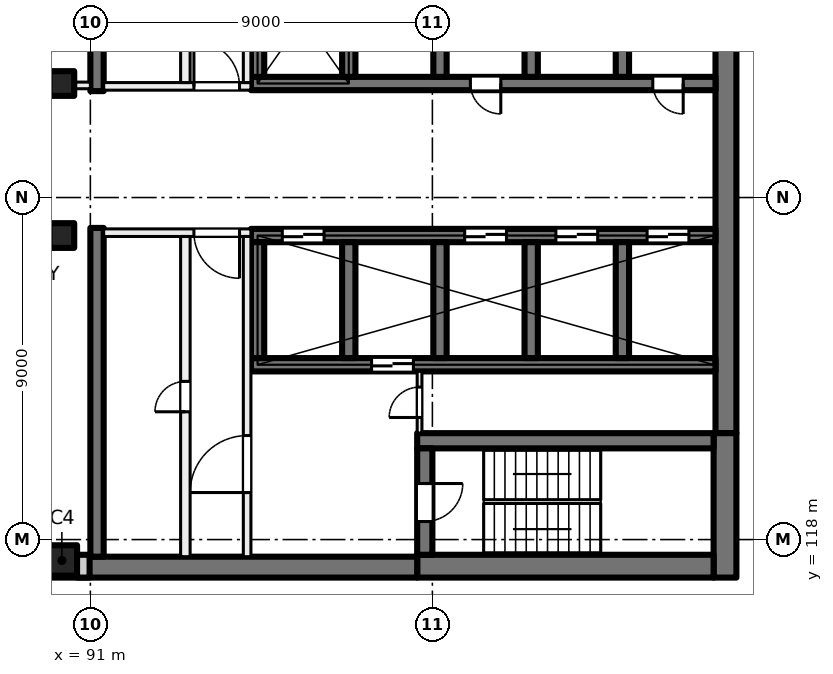
"""IFC4 building model, lengths in metres.
Left out: names, types, materials, properties, quantities, classifications, styles, units other than length and angle.
Written with IfcOpenShell. Run it as: python <this file> out.ifc"""

import sys

from ifc_helpers import new_model, si_unit, direction, frame, frame_2d, origin, origin_2d, place, context, subcontext, project, spatial, rectangle, extrude, element, fill, save


model = new_model("IFC4")
c1 = context("Model", 3, precision=1e-05, world=origin(), true_north=direction((0.0, 1.0)))
c2 = subcontext(c1, "Body", "Model", "MODEL_VIEW")
j1 = project(units=[si_unit("LENGTHUNIT", "METRE"), si_unit("PLANEANGLEUNIT", "RADIAN")], contexts=[c1])
p1 = place(None, origin())
s1 = spatial("IfcSite", under=j1, at=p1, CompositionType="ELEMENT")
p2 = place(p1, origin())
s2 = spatial("IfcBuilding", under=s1, at=p2, CompositionType="ELEMENT")
p3 = place(p2, frame((0.0, 0.0, 150.5)))
s3 = spatial("IfcBuildingStorey", under=s2, at=p3, CompositionType="ELEMENT", Elevation=150.5)
for number, where, z_axis, x_axis in (
    (1, (90.25, 130.0, 0.0), (0.0, 0.0, 1.0), (1.0, 0.0, 0.0)),
    (2, (90.25, 126.0, 0.0), (0.0, 0.0, 1.0), (1.0, 0.0, 0.0)),
):
    element("IfcColumn", number, at=place(p3, frame(where, z_axis=z_axis, x_axis=x_axis)), inside=s3, PredefinedType="COLUMN", context=c2, shape_type="SweptSolid", body=[
        extrude(rectangle(XDim=0.65, YDim=0.65, at=origin_2d()), origin(), (0.0, 0.0, 1.0), 4.0),
    ])
p4 = place(p3, frame((90.25, 117.45, 0.0), z_axis=(0.0, 0.0, 1.0), x_axis=(1.0, 0.0, 0.0)))
e3 = element("IfcColumn", 3, at=p4, inside=s3, PredefinedType="COLUMN", context=c2, shape_type="SweptSolid", body=[
    extrude(rectangle(XDim=0.8, YDim=0.8, at=origin_2d()), origin(), (0.0, 0.0, 1.0), 4.0),
])
p5 = place(p3, frame((107.725, 135.2, 0.0), z_axis=(0.0, 0.0, 1.0), x_axis=(0.0, -1.0, 0.0)))
e4 = element("IfcWall", 4, at=p5, inside=s3, PredefinedType="SHEAR", context=c2, shape_type="SweptSolid", body=[
    extrude(rectangle(XDim=14.4, YDim=0.55, at=frame_2d((7.2, 0.0))), origin(), (0.0, 0.0, 1.0), 4.0),
])
p6 = place(p3, frame((107.7, 120.8, 0.0), z_axis=(0.0, 0.0, 1.0), x_axis=(0.0, -1.0, 0.0)))
e5 = element("IfcWall", 5, at=p6, inside=s3, PredefinedType="SHEAR", context=c2, shape_type="SweptSolid", body=[
    extrude(rectangle(XDim=3.8, YDim=0.6, at=frame_2d((1.9, 0.0))), origin(), (0.0, 0.0, 1.0), 4.0),
])
p7 = place(p3, frame((107.4, 117.3, 0.0), z_axis=(0.0, 0.0, 1.0), x_axis=(-1.0, 0.0, 0.0)))
e6 = element("IfcWall", 6, at=p7, inside=s3, PredefinedType="SHEAR", context=c2, shape_type="SweptSolid", body=[
    extrude(rectangle(XDim=7.8, YDim=0.6, at=frame_2d((3.9, 0.0))), origin(), (0.0, 0.0, 1.0), 4.0),
])
p8 = place(p3, frame((99.6, 117.275, 0.0), z_axis=(0.0, 0.0, 1.0), x_axis=(-1.0, 0.0, 0.0)))
e7 = element("IfcWall", 7, at=p8, inside=s3, PredefinedType="SHEAR", context=c2, shape_type="SweptSolid", body=[
    extrude(rectangle(XDim=8.95, YDim=0.55, at=frame_2d((4.475, 0.0))), origin(), (0.0, 0.0, 1.0), 4.0),
])
p9 = place(p3, frame((107.4, 120.6, 0.0), z_axis=(0.0, 0.0, 1.0), x_axis=(-1.0, 0.0, 0.0)))
e8 = element("IfcWall", 8, at=p9, inside=s3, PredefinedType="SHEAR", context=c2, shape_type="SweptSolid", body=[
    extrude(rectangle(XDim=7.8, YDim=0.4, at=frame_2d((3.9, 0.0))), origin(), (0.0, 0.0, 1.0), 4.0),
])
p10 = place(p3, frame((99.8, 120.4, 0.0), z_axis=(0.0, 0.0, 1.0), x_axis=(0.0, -1.0, 0.0)))
e9 = element("IfcWall", 9, at=p10, inside=s3, PredefinedType="SHEAR", context=c2, shape_type="SweptSolid", body=[
    extrude(rectangle(XDim=2.8, YDim=0.4, at=frame_2d((1.4, 0.0))), origin(), (0.0, 0.0, 1.0), 4.0),
])
p11 = place(p10, frame((0.925, 0.0, 0.0)))
e10 = element("IfcOpeningElement", 10, at=p11, cuts=e9, PredefinedType="OPENING", context=c2, shape_type="SweptSolid", body=[
    extrude(rectangle(XDim=1.0, YDim=2.1, at=frame_2d((0.5, 1.05))), frame((0.0, 0.21, 0.0), z_axis=(0.0, -1.0, 0.0), x_axis=(1.0, 0.0, 0.0)), (0.0, 0.0, 1.0), 0.42),
])
p12 = place(p3, frame((107.45, 130.0, 0.0), z_axis=(0.0, 0.0, 1.0), x_axis=(-1.0, 0.0, 0.0)))
e11 = element("IfcWall", 11, at=p12, inside=s3, PredefinedType="SHEAR", context=c2, shape_type="SweptSolid", body=[
    extrude(rectangle(XDim=12.225, YDim=0.35, at=frame_2d((6.112, 0.0))), origin(), (0.0, 0.0, 1.0), 4.0),
])
p13 = place(p12, frame((0.85, 0.0, 0.0)))
e12 = element("IfcOpeningElement", 12, at=p13, cuts=e11, PredefinedType="OPENING", context=c2, shape_type="SweptSolid", body=[
    extrude(rectangle(XDim=0.8, YDim=2.1, at=frame_2d((0.4, 1.05))), frame((0.0, 0.185, 0.0), z_axis=(0.0, -1.0, 0.0), x_axis=(1.0, 0.0, 0.0)), (0.0, 0.0, 1.0), 0.37),
])
p14 = place(p12, frame((5.65, 0.0, 0.0)))
e13 = element("IfcOpeningElement", 13, at=p14, cuts=e11, PredefinedType="OPENING", context=c2, shape_type="SweptSolid", body=[
    extrude(rectangle(XDim=0.8, YDim=2.1, at=frame_2d((0.4, 1.05))), frame((0.0, 0.185, 0.0), z_axis=(0.0, -1.0, 0.0), x_axis=(1.0, 0.0, 0.0)), (0.0, 0.0, 1.0), 0.37),
])
for number, where, z_axis, x_axis in (
    (14, (105.0, 133.225, 0.0), (0.0, 0.0, 1.0), (0.0, -1.0, 0.0)),
    (15, (102.6, 133.225, 0.0), (0.0, 0.0, 1.0), (0.0, -1.0, 0.0)),
    (16, (100.2, 133.225, 0.0), (0.0, 0.0, 1.0), (0.0, -1.0, 0.0)),
    (17, (97.8, 133.225, 0.0), (0.0, 0.0, 1.0), (0.0, -1.0, 0.0)),
    (18, (95.4, 133.225, 0.0), (0.0, 0.0, 1.0), (0.0, -1.0, 0.0)),
):
    element("IfcWall", number, at=place(p3, frame(where, z_axis=z_axis, x_axis=x_axis)), inside=s3, PredefinedType="SHEAR", context=c2, shape_type="SweptSolid", body=[
        extrude(rectangle(XDim=3.05, YDim=0.35, at=frame_2d((1.525, 0.0))), origin(), (0.0, 0.0, 1.0), 4.0),
    ])
p15 = place(p3, frame((107.45, 126.0, 0.0), z_axis=(0.0, 0.0, 1.0), x_axis=(-1.0, 0.0, 0.0)))
e19 = element("IfcWall", 19, at=p15, inside=s3, PredefinedType="SHEAR", context=c2, shape_type="SweptSolid", body=[
    extrude(rectangle(XDim=12.225, YDim=0.35, at=frame_2d((6.112, 0.0))), origin(), (0.0, 0.0, 1.0), 4.0),
])
p16 = place(p15, frame((0.7, 0.0, 0.0)))
e20 = element("IfcOpeningElement", 20, at=p16, cuts=e19, PredefinedType="OPENING", context=c2, shape_type="SweptSolid", body=[
    extrude(rectangle(XDim=1.1, YDim=2.1, at=frame_2d((0.55, 1.05))), frame((0.0, 0.185, 0.0), z_axis=(0.0, -1.0, 0.0), x_axis=(1.0, 0.0, 0.0)), (0.0, 0.0, 1.0), 0.37),
])
p17 = place(p15, frame((3.1, 0.0, 0.0)))
e21 = element("IfcOpeningElement", 21, at=p17, cuts=e19, PredefinedType="OPENING", context=c2, shape_type="SweptSolid", body=[
    extrude(rectangle(XDim=1.1, YDim=2.1, at=frame_2d((0.55, 1.05))), frame((0.0, 0.185, 0.0), z_axis=(0.0, -1.0, 0.0), x_axis=(1.0, 0.0, 0.0)), (0.0, 0.0, 1.0), 0.37),
])
p18 = place(p15, frame((5.5, 0.0, 0.0)))
e22 = element("IfcOpeningElement", 22, at=p18, cuts=e19, PredefinedType="OPENING", context=c2, shape_type="SweptSolid", body=[
    extrude(rectangle(XDim=1.1, YDim=2.1, at=frame_2d((0.55, 1.05))), frame((0.0, 0.185, 0.0), z_axis=(0.0, -1.0, 0.0), x_axis=(1.0, 0.0, 0.0)), (0.0, 0.0, 1.0), 0.37),
])
p19 = place(p15, frame((10.3, 0.0, 0.0)))
e23 = element("IfcOpeningElement", 23, at=p19, cuts=e19, PredefinedType="OPENING", context=c2, shape_type="SweptSolid", body=[
    extrude(rectangle(XDim=1.1, YDim=2.1, at=frame_2d((0.55, 1.05))), frame((0.0, 0.185, 0.0), z_axis=(0.0, -1.0, 0.0), x_axis=(1.0, 0.0, 0.0)), (0.0, 0.0, 1.0), 0.37),
])
p20 = place(p3, frame((107.45, 122.6, 0.0), z_axis=(0.0, 0.0, 1.0), x_axis=(-1.0, 0.0, 0.0)))
e24 = element("IfcWall", 24, at=p20, inside=s3, PredefinedType="SHEAR", context=c2, shape_type="SweptSolid", body=[
    extrude(rectangle(XDim=12.225, YDim=0.35, at=frame_2d((6.112, 0.0))), origin(), (0.0, 0.0, 1.0), 4.0),
])
p21 = place(p20, frame((7.95, 0.0, 0.0)))
e25 = element("IfcOpeningElement", 25, at=p21, cuts=e24, PredefinedType="OPENING", context=c2, shape_type="SweptSolid", body=[
    extrude(rectangle(XDim=1.1, YDim=2.1, at=frame_2d((0.55, 1.05))), frame((0.0, 0.185, 0.0), z_axis=(0.0, -1.0, 0.0), x_axis=(1.0, 0.0, 0.0)), (0.0, 0.0, 1.0), 0.37),
])
for number, where, z_axis, x_axis in (
    (26, (105.0, 125.825, 0.0), (0.0, 0.0, 1.0), (0.0, -1.0, 0.0)),
    (27, (102.6, 125.825, 0.0), (0.0, 0.0, 1.0), (0.0, -1.0, 0.0)),
    (28, (100.2, 125.825, 0.0), (0.0, 0.0, 1.0), (0.0, -1.0, 0.0)),
    (29, (97.8, 125.825, 0.0), (0.0, 0.0, 1.0), (0.0, -1.0, 0.0)),
    (30, (95.4, 125.825, 0.0), (0.0, 0.0, 1.0), (0.0, -1.0, 0.0)),
):
    element("IfcWall", number, at=place(p3, frame(where, z_axis=z_axis, x_axis=x_axis)), inside=s3, PredefinedType="SHEAR", context=c2, shape_type="SweptSolid", body=[
        extrude(rectangle(XDim=3.05, YDim=0.35, at=frame_2d((1.525, 0.0))), origin(), (0.0, 0.0, 1.0), 4.0),
    ])
for number, where, z_axis, x_axis in (
    (31, (91.175, 138.45, 0.0), (0.0, 0.0, 1.0), (0.0, -1.0, 0.0)),
    (32, (91.175, 126.2, 0.0), (0.0, 0.0, 1.0), (0.0, -1.0, 0.0)),
):
    element("IfcWall", number, at=place(p3, frame(where, z_axis=z_axis, x_axis=x_axis)), inside=s3, PredefinedType="SHEAR", context=c2, shape_type="SweptSolid", body=[
        extrude(rectangle(XDim=8.65, YDim=0.35, at=frame_2d((4.325, 0.0))), origin(), (0.0, 0.0, 1.0), 4.0),
    ])
p22 = place(p3, frame((90.98, 117.3, 0.0), z_axis=(0.0, 0.0, 1.0), x_axis=(-1.0, 0.0, 0.0)))
e33 = element("IfcWall", 33, at=p22, inside=s3, PredefinedType="SOLIDWALL", context=c2, shape_type="SweptSolid", body=[
    extrude(rectangle(XDim=33.745, YDim=0.6, at=frame_2d((16.873, 0.0))), origin(), (0.0, 0.0, 1.0), 3.625),
])
p23 = place(p22, frame((1.48, 0.0, 0.9)))
e34 = element("IfcOpeningElement", 34, at=p23, cuts=e33, PredefinedType="OPENING", context=c2, shape_type="SweptSolid", body=[
    extrude(rectangle(XDim=3.0, YDim=2.4, at=frame_2d((1.5, 1.2))), frame((0.0, 0.31, 0.0), z_axis=(0.0, -1.0, 0.0), x_axis=(1.0, 0.0, 0.0)), (0.0, 0.0, 1.0), 0.62),
])
p24 = place(p22, frame((5.98, 0.0, 0.9)))
e35 = element("IfcOpeningElement", 35, at=p24, cuts=e33, PredefinedType="OPENING", context=c2, shape_type="SweptSolid", body=[
    extrude(rectangle(XDim=3.0, YDim=2.4, at=frame_2d((1.5, 1.2))), frame((0.0, 0.31, 0.0), z_axis=(0.0, -1.0, 0.0), x_axis=(1.0, 0.0, 0.0)), (0.0, 0.0, 1.0), 0.62),
])
p25 = place(p22, frame((10.48, 0.0, 0.9)))
e36 = element("IfcOpeningElement", 36, at=p25, cuts=e33, PredefinedType="OPENING", context=c2, shape_type="SweptSolid", body=[
    extrude(rectangle(XDim=3.0, YDim=2.4, at=frame_2d((1.5, 1.2))), frame((0.0, 0.31, 0.0), z_axis=(0.0, -1.0, 0.0), x_axis=(1.0, 0.0, 0.0)), (0.0, 0.0, 1.0), 0.62),
])
p26 = place(p22, frame((14.98, 0.0, 0.9)))
e37 = element("IfcOpeningElement", 37, at=p26, cuts=e33, PredefinedType="OPENING", context=c2, shape_type="SweptSolid", body=[
    extrude(rectangle(XDim=3.0, YDim=2.4, at=frame_2d((1.5, 1.2))), frame((0.0, 0.31, 0.0), z_axis=(0.0, -1.0, 0.0), x_axis=(1.0, 0.0, 0.0)), (0.0, 0.0, 1.0), 0.62),
])
p27 = place(p22, frame((19.48, 0.0, 0.9)))
e38 = element("IfcOpeningElement", 38, at=p27, cuts=e33, PredefinedType="OPENING", context=c2, shape_type="SweptSolid", body=[
    extrude(rectangle(XDim=3.0, YDim=2.4, at=frame_2d((1.5, 1.2))), frame((0.0, 0.31, 0.0), z_axis=(0.0, -1.0, 0.0), x_axis=(1.0, 0.0, 0.0)), (0.0, 0.0, 1.0), 0.62),
])
p28 = place(p22, frame((23.98, 0.0, 0.9)))
e39 = element("IfcOpeningElement", 39, at=p28, cuts=e33, PredefinedType="OPENING", context=c2, shape_type="SweptSolid", body=[
    extrude(rectangle(XDim=3.0, YDim=2.4, at=frame_2d((1.5, 1.2))), frame((0.0, 0.31, 0.0), z_axis=(0.0, -1.0, 0.0), x_axis=(1.0, 0.0, 0.0)), (0.0, 0.0, 1.0), 0.62),
])
p29 = place(p22, frame((28.48, 0.0, 0.9)))
e40 = element("IfcOpeningElement", 40, at=p29, cuts=e33, PredefinedType="OPENING", context=c2, shape_type="SweptSolid", body=[
    extrude(rectangle(XDim=3.0, YDim=2.4, at=frame_2d((1.5, 1.2))), frame((0.0, 0.31, 0.0), z_axis=(0.0, -1.0, 0.0), x_axis=(1.0, 0.0, 0.0)), (0.0, 0.0, 1.0), 0.62),
])
p30 = place(p3, frame((95.225, 126.075, 0.0), z_axis=(0.0, 0.0, 1.0), x_axis=(-1.0, 0.0, 0.0)))
e41 = element("IfcWall", 41, at=p30, inside=s3, PredefinedType="PARTITIONING", context=c2, shape_type="SweptSolid", body=[
    extrude(rectangle(XDim=3.875, YDim=0.2, at=frame_2d((1.938, 0.0))), origin(), (0.0, 0.0, 1.0), 3.625),
])
p31 = place(p30, frame((0.3, 0.0, 0.0)))
e42 = element("IfcOpeningElement", 42, at=p31, cuts=e41, PredefinedType="OPENING", context=c2, shape_type="SweptSolid", body=[
    extrude(rectangle(XDim=1.2, YDim=2.1, at=frame_2d((0.6, 1.05))), frame((0.0, 0.11, 0.0), z_axis=(0.0, -1.0, 0.0), x_axis=(1.0, 0.0, 0.0)), (0.0, 0.0, 1.0), 0.22),
])
p32 = place(p3, frame((95.125, 117.55, 0.0), z_axis=(0.0, 0.0, 1.0), x_axis=(0.0, 1.0, 0.0)))
e43 = element("IfcWall", 43, at=p32, inside=s3, PredefinedType="PARTITIONING", context=c2, shape_type="SweptSolid", body=[
    extrude(rectangle(XDim=8.425, YDim=0.2, at=frame_2d((4.212, 0.0))), origin(), (0.0, 0.0, 1.0), 3.625),
])
p33 = place(p32, frame((1.688, 0.0, 0.0)))
e44 = element("IfcOpeningElement", 44, at=p33, cuts=e43, PredefinedType="OPENING", context=c2, shape_type="SweptSolid", body=[
    extrude(rectangle(XDim=1.5, YDim=2.1, at=frame_2d((0.75, 1.05))), frame((0.0, 0.11, 0.0), z_axis=(0.0, -1.0, 0.0), x_axis=(1.0, 0.0, 0.0)), (0.0, 0.0, 1.0), 0.22),
])
p34 = place(p3, frame((93.5, 117.55, 0.0), z_axis=(0.0, 0.0, 1.0), x_axis=(0.0, 1.0, 0.0)))
e45 = element("IfcWall", 45, at=p34, inside=s3, PredefinedType="PARTITIONING", context=c2, shape_type="SweptSolid", body=[
    extrude(rectangle(XDim=8.425, YDim=0.25, at=frame_2d((4.212, 0.0))), origin(), (0.0, 0.0, 1.0), 3.625),
])
p35 = place(p34, frame((3.812, 0.0, 0.0)))
e46 = element("IfcOpeningElement", 46, at=p35, cuts=e45, PredefinedType="OPENING", context=c2, shape_type="SweptSolid", body=[
    extrude(rectangle(XDim=0.8, YDim=2.1, at=frame_2d((0.4, 1.05))), frame((0.0, 0.135, 0.0), z_axis=(0.0, -1.0, 0.0), x_axis=(1.0, 0.0, 0.0)), (0.0, 0.0, 1.0), 0.27),
])
p36 = place(p3, frame((99.663, 120.8, 0.0), z_axis=(0.0, 0.0, 1.0), x_axis=(0.0, 1.0, 0.0)))
e47 = element("IfcWall", 47, at=p36, inside=s3, PredefinedType="PARTITIONING", context=c2, shape_type="SweptSolid", body=[
    extrude(rectangle(XDim=1.625, YDim=0.125, at=frame_2d((0.812, 0.0))), origin(), (0.0, 0.0, 1.0), 3.625),
])
p37 = place(p36, frame((0.413, 0.0, 0.0)))
e48 = element("IfcOpeningElement", 48, at=p37, cuts=e47, PredefinedType="OPENING", context=c2, shape_type="SweptSolid", body=[
    extrude(rectangle(XDim=0.8, YDim=2.1, at=frame_2d((0.4, 1.05))), frame((0.0, 0.073, 0.0), z_axis=(0.0, -1.0, 0.0), x_axis=(1.0, 0.0, 0.0)), (0.0, 0.0, 1.0), 0.145),
])
p38 = place(p3, frame((91.35, 129.925, 0.0), z_axis=(0.0, 0.0, 1.0), x_axis=(1.0, 0.0, 0.0)))
e49 = element("IfcWall", 49, at=p38, inside=s3, PredefinedType="PARTITIONING", context=c2, shape_type="SweptSolid", body=[
    extrude(rectangle(XDim=3.875, YDim=0.2, at=frame_2d((1.938, 0.0))), origin(), (0.0, 0.0, 1.0), 3.625),
])
p39 = place(p38, frame((2.375, 0.0, 0.0)))
e50 = element("IfcOpeningElement", 50, at=p39, cuts=e49, PredefinedType="OPENING", context=c2, shape_type="SweptSolid", body=[
    extrude(rectangle(XDim=1.2, YDim=2.1, at=frame_2d((0.6, 1.05))), frame((0.0, 0.11, 0.0), z_axis=(0.0, -1.0, 0.0), x_axis=(1.0, 0.0, 0.0)), (0.0, 0.0, 1.0), 0.22),
])
p40 = place(p3, frame((95.125, 130.025, 0.0), z_axis=(0.0, 0.0, 1.0), x_axis=(0.0, 1.0, 0.0)))
e51 = element("IfcWall", 51, at=p40, inside=s3, PredefinedType="PARTITIONING", context=c2, shape_type="SweptSolid", body=[
    extrude(rectangle(XDim=8.425, YDim=0.2, at=frame_2d((4.212, 0.0))), origin(), (0.0, 0.0, 1.0), 3.625),
])
p41 = place(p40, frame((5.238, 0.0, 0.0)))
e52 = element("IfcOpeningElement", 52, at=p41, cuts=e51, PredefinedType="OPENING", context=c2, shape_type="SweptSolid", body=[
    extrude(rectangle(XDim=1.5, YDim=2.1, at=frame_2d((0.75, 1.05))), frame((0.0, 0.11, 0.0), z_axis=(0.0, -1.0, 0.0), x_axis=(1.0, 0.0, 0.0)), (0.0, 0.0, 1.0), 0.22),
])
p42 = place(p3, frame((93.5, 130.025, 0.0), z_axis=(0.0, 0.0, 1.0), x_axis=(0.0, 1.0, 0.0)))
e53 = element("IfcWall", 53, at=p42, inside=s3, PredefinedType="PARTITIONING", context=c2, shape_type="SweptSolid", body=[
    extrude(rectangle(XDim=8.425, YDim=0.25, at=frame_2d((4.212, 0.0))), origin(), (0.0, 0.0, 1.0), 3.625),
])
p43 = place(p42, frame((3.812, 0.0, 0.0)))
e54 = element("IfcOpeningElement", 54, at=p43, cuts=e53, PredefinedType="OPENING", context=c2, shape_type="SweptSolid", body=[
    extrude(rectangle(XDim=0.8, YDim=2.1, at=frame_2d((0.4, 1.05))), frame((0.0, 0.135, 0.0), z_axis=(0.0, -1.0, 0.0), x_axis=(1.0, 0.0, 0.0)), (0.0, 0.0, 1.0), 0.27),
])
p44 = place(p3, frame((85.838, 129.95, 0.0), z_axis=(0.0, 0.0, 1.0), x_axis=(1.0, 0.0, 0.0)))
e55 = element("IfcWall", 55, at=p44, inside=s3, PredefinedType="PARTITIONING", context=c2, shape_type="SweptSolid", body=[
    extrude(rectangle(XDim=5.162, YDim=0.175, at=frame_2d((2.581, 0.0))), origin(), (0.0, 0.0, 1.0), 3.625),
])
p45 = place(p44, frame((1.971, 0.0, 0.0)))
e56 = element("IfcOpeningElement", 56, at=p45, cuts=e55, PredefinedType="OPENING", context=c2, shape_type="SweptSolid", body=[
    extrude(rectangle(XDim=1.2, YDim=2.1, at=frame_2d((0.6, 1.05))), frame((0.0, 0.097, 0.0), z_axis=(0.0, -1.0, 0.0), x_axis=(1.0, 0.0, 0.0)), (0.0, 0.0, 1.0), 0.195),
])
p46 = place(p16, origin())
e57 = element("IfcDoor", 57, at=p46, inside=s3, OperationType="DOUBLE_DOOR_SLIDING", PredefinedType="DOOR", context=c2, shape_type="SweptSolid", body=[
    extrude(rectangle(XDim=1.1, YDim=2.1, at=frame_2d((0.55, 1.05))), frame((0.0, 0.025, 0.0), z_axis=(0.0, -1.0, 0.0), x_axis=(1.0, 0.0, 0.0)), (0.0, 0.0, 1.0), 0.05),
])
fill(e20, e57)
p47 = place(p17, origin())
e58 = element("IfcDoor", 58, at=p47, inside=s3, OperationType="DOUBLE_DOOR_SLIDING", PredefinedType="DOOR", context=c2, shape_type="SweptSolid", body=[
    extrude(rectangle(XDim=1.1, YDim=2.1, at=frame_2d((0.55, 1.05))), frame((0.0, 0.025, 0.0), z_axis=(0.0, -1.0, 0.0), x_axis=(1.0, 0.0, 0.0)), (0.0, 0.0, 1.0), 0.05),
])
fill(e21, e58)
p48 = place(p18, origin())
e59 = element("IfcDoor", 59, at=p48, inside=s3, OperationType="DOUBLE_DOOR_SLIDING", PredefinedType="DOOR", context=c2, shape_type="SweptSolid", body=[
    extrude(rectangle(XDim=1.1, YDim=2.1, at=frame_2d((0.55, 1.05))), frame((0.0, 0.025, 0.0), z_axis=(0.0, -1.0, 0.0), x_axis=(1.0, 0.0, 0.0)), (0.0, 0.0, 1.0), 0.05),
])
fill(e22, e59)
p49 = place(p19, origin())
e60 = element("IfcDoor", 60, at=p49, inside=s3, OperationType="DOUBLE_DOOR_SLIDING", PredefinedType="DOOR", context=c2, shape_type="SweptSolid", body=[
    extrude(rectangle(XDim=1.1, YDim=2.1, at=frame_2d((0.55, 1.05))), frame((0.0, 0.025, 0.0), z_axis=(0.0, -1.0, 0.0), x_axis=(1.0, 0.0, 0.0)), (0.0, 0.0, 1.0), 0.05),
])
fill(e23, e60)
p50 = place(p13, origin())
e61 = element("IfcDoor", 61, at=p50, inside=s3, OperationType="SINGLE_SWING_LEFT", PredefinedType="DOOR", context=c2, shape_type="SweptSolid", body=[
    extrude(rectangle(XDim=0.8, YDim=2.1, at=frame_2d((0.4, 1.05))), frame((0.0, 0.025, 0.0), z_axis=(0.0, -1.0, 0.0), x_axis=(1.0, 0.0, 0.0)), (0.0, 0.0, 1.0), 0.05),
])
fill(e12, e61)
p51 = place(p14, origin())
e62 = element("IfcDoor", 62, at=p51, inside=s3, OperationType="SINGLE_SWING_RIGHT", PredefinedType="DOOR", context=c2, shape_type="SweptSolid", body=[
    extrude(rectangle(XDim=0.8, YDim=2.1, at=frame_2d((0.4, 1.05))), frame((0.0, 0.025, 0.0), z_axis=(0.0, -1.0, 0.0), x_axis=(1.0, 0.0, 0.0)), (0.0, 0.0, 1.0), 0.05),
])
fill(e13, e62)
p52 = place(p31, origin())
e63 = element("IfcDoor", 63, at=p52, inside=s3, OperationType="DOUBLE_DOOR_SINGLE_SWING", PredefinedType="DOOR", context=c2, shape_type="SweptSolid", body=[
    extrude(rectangle(XDim=1.2, YDim=2.1, at=frame_2d((0.6, 1.05))), frame((0.0, 0.025, 0.0), z_axis=(0.0, -1.0, 0.0), x_axis=(1.0, 0.0, 0.0)), (0.0, 0.0, 1.0), 0.05),
])
fill(e42, e63)
p53 = place(p33, origin())
e64 = element("IfcDoor", 64, at=p53, inside=s3, OperationType="DOUBLE_DOOR_SINGLE_SWING", PredefinedType="DOOR", context=c2, shape_type="SweptSolid", body=[
    extrude(rectangle(XDim=1.5, YDim=2.1, at=frame_2d((0.75, 1.05))), frame((0.0, 0.025, 0.0), z_axis=(0.0, -1.0, 0.0), x_axis=(1.0, 0.0, 0.0)), (0.0, 0.0, 1.0), 0.05),
])
fill(e44, e64)
p54 = place(p11, origin())
e65 = element("IfcDoor", 65, at=p54, inside=s3, OperationType="SINGLE_SWING_LEFT", PredefinedType="DOOR", context=c2, shape_type="SweptSolid", body=[
    extrude(rectangle(XDim=1.0, YDim=2.1, at=frame_2d((0.5, 1.05))), frame((0.0, 0.025, 0.0), z_axis=(0.0, -1.0, 0.0), x_axis=(1.0, 0.0, 0.0)), (0.0, 0.0, 1.0), 0.05),
])
fill(e10, e65)
p55 = place(p37, origin())
e66 = element("IfcDoor", 66, at=p55, inside=s3, OperationType="SINGLE_SWING_RIGHT", PredefinedType="DOOR", context=c2, shape_type="SweptSolid", body=[
    extrude(rectangle(XDim=0.8, YDim=2.1, at=frame_2d((0.4, 1.05))), frame((0.0, 0.025, 0.0), z_axis=(0.0, -1.0, 0.0), x_axis=(1.0, 0.0, 0.0)), (0.0, 0.0, 1.0), 0.05),
])
fill(e48, e66)
p56 = place(p35, origin())
e67 = element("IfcDoor", 67, at=p56, inside=s3, OperationType="SINGLE_SWING_LEFT", PredefinedType="DOOR", context=c2, shape_type="SweptSolid", body=[
    extrude(rectangle(XDim=0.8, YDim=2.1, at=frame_2d((0.4, 1.05))), frame((0.0, 0.025, 0.0), z_axis=(0.0, -1.0, 0.0), x_axis=(1.0, 0.0, 0.0)), (0.0, 0.0, 1.0), 0.05),
])
fill(e46, e67)
p57 = place(p39, origin())
e68 = element("IfcDoor", 68, at=p57, inside=s3, OperationType="DOUBLE_DOOR_SINGLE_SWING", PredefinedType="DOOR", context=c2, shape_type="SweptSolid", body=[
    extrude(rectangle(XDim=1.2, YDim=2.1, at=frame_2d((0.6, 1.05))), frame((0.0, 0.025, 0.0), z_axis=(0.0, -1.0, 0.0), x_axis=(1.0, 0.0, 0.0)), (0.0, 0.0, 1.0), 0.05),
])
fill(e50, e68)
p58 = place(p21, origin())
e69 = element("IfcDoor", 69, at=p58, inside=s3, OperationType="DOUBLE_DOOR_SLIDING", PredefinedType="DOOR", context=c2, shape_type="SweptSolid", body=[
    extrude(rectangle(XDim=1.1, YDim=2.1, at=frame_2d((0.55, 1.05))), frame((0.0, 0.025, 0.0), z_axis=(0.0, -1.0, 0.0), x_axis=(1.0, 0.0, 0.0)), (0.0, 0.0, 1.0), 0.05),
])
fill(e25, e69)
save(model, sys.argv[1])
